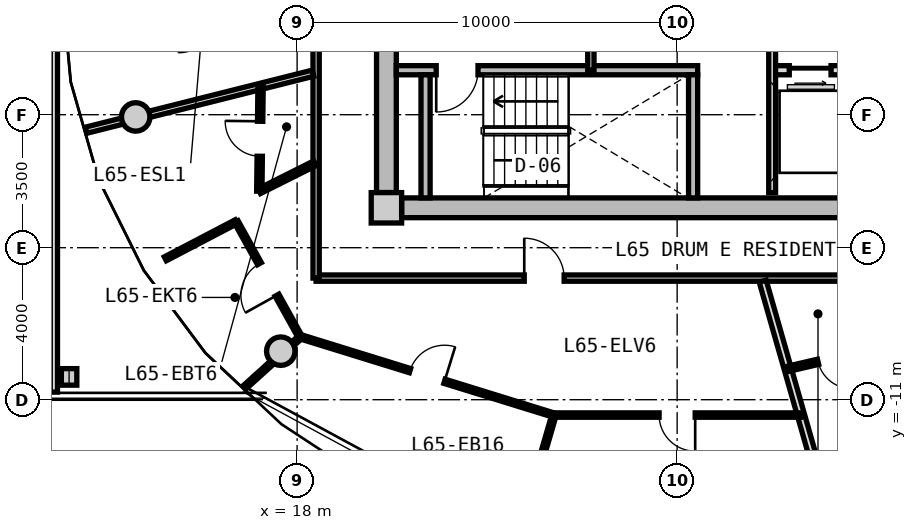
"""IFC4 building model, lengths in metres.
Left out: names, types, materials, properties, quantities, classifications, styles, units other than length and angle.
Written with IfcOpenShell. Run it as: python <this file> out.ifc"""

import sys

from ifc_helpers import new_model, si_unit, direction, frame, frame_2d, origin, origin_2d, place, context, subcontext, project, spatial, rectangle, circle, i_section, extrude, source, transform, mapped, element, fill, save


model = new_model("IFC4")
c1 = context("Model", 3, precision=1e-05, world=origin(), true_north=direction((0.0, 1.0)))
c2 = subcontext(c1, "Body", "Model", "MODEL_VIEW")
j1 = project(units=[si_unit("LENGTHUNIT", "METRE"), si_unit("PLANEANGLEUNIT", "RADIAN")], contexts=[c1])
p1 = place(None, origin())
s1 = spatial("IfcSite", under=j1, at=p1, CompositionType="ELEMENT")
p2 = place(p1, origin())
s2 = spatial("IfcBuilding", under=s1, at=p2, CompositionType="ELEMENT")
p3 = place(p2, frame((0.0, 0.0, 210.85)))
s3 = spatial("IfcBuildingStorey", under=s2, at=p3, CompositionType="ELEMENT", Elevation=210.85)
m1 = source(origin(), c2, "Body", "SweptSolid", [
    extrude(rectangle(XDim=0.8, YDim=0.8, at=origin_2d()), origin(), (0.0, 0.0, 1.0), 3.05),
])
p4 = place(p3, frame((20.35, -5.95, 0.0), z_axis=(0.0, 0.0, 1.0), x_axis=(1.0, 0.0, 0.0)))
e1 = element("IfcColumn", 1, at=p4, inside=s3, PredefinedType="COLUMN", context=c2, shape_type="MappedRepresentation", body=[
    mapped(m1, transform((0.0, 0.0, 0.0), x_axis=(1.0, 0.0, 0.0), y_axis=(0.0, 1.0, 0.0), z_axis=(0.0, 0.0, 1.0), scale=1.0)),
])
m2 = source(origin(), c2, "Body", "SweptSolid", [
    extrude(rectangle(XDim=14.5, YDim=0.52, at=frame_2d((7.25, 0.0))), origin(), (0.0, 0.0, 1.0), 2.76),
])
p5 = place(p3, frame((35.25, -5.95, 0.0), z_axis=(0.0, 0.0, 1.0), x_axis=(-1.0, 0.0, 0.0)))
e2 = element("IfcWall", 2, at=p5, inside=s3, PredefinedType="SHEAR", context=c2, shape_type="MappedRepresentation", body=[
    mapped(m2, transform((0.0, 0.0, 0.0), x_axis=(1.0, 0.0, 0.0), y_axis=(0.0, 1.0, 0.0), z_axis=(0.0, 0.0, 1.0), scale=1.0)),
])
m3 = source(origin(), c2, "Body", "SweptSolid", [
    extrude(rectangle(XDim=11.1, YDim=0.52, at=frame_2d((5.55, 0.0))), origin(), (0.0, 0.0, 1.0), 2.76),
])
p6 = place(p3, frame((20.35, -5.55, 0.0), z_axis=(0.0, 0.0, 1.0), x_axis=(0.0, 1.0, 0.0)))
e3 = element("IfcWall", 3, at=p6, inside=s3, PredefinedType="SHEAR", context=c2, shape_type="MappedRepresentation", body=[
    mapped(m3, transform((0.0, 0.0, 0.0), x_axis=(1.0, 0.0, 0.0), y_axis=(0.0, 1.0, 0.0), z_axis=(0.0, 0.0, 1.0), scale=1.0)),
])
p7 = place(p6, frame((3.8, 0.0, 0.0)))
e4 = element("IfcOpeningElement", 4, at=p7, cuts=e3, PredefinedType="OPENING", context=c2, shape_type="SweptSolid", body=[
    extrude(rectangle(XDim=1.2, YDim=2.15, at=frame_2d((0.6, 1.075))), frame((0.0, 0.27, 0.0), z_axis=(0.0, -1.0, 0.0), x_axis=(1.0, 0.0, 0.0)), (0.0, 0.0, 1.0), 0.54),
])
m4 = source(origin(), c2, "Body", "SweptSolid", [
    extrude(circle(Radius=0.375, at=origin_2d()), origin(), (0.0, 0.0, 1.0), 3.05),
])
for number, where, z_axis, x_axis in (
    (5, (13.753, -3.559, 0.0), (0.0, 0.0, 1.0), (1.0, 0.0, 0.0)),
    (6, (17.57, -9.723, 0.0), (0.0, 0.0, 1.0), (1.0, 0.0, 0.0)),
):
    element("IfcColumn", number, at=place(p3, frame(where, z_axis=z_axis, x_axis=x_axis)), inside=s3, PredefinedType="COLUMN", context=c2, shape_type="MappedRepresentation", body=[
        mapped(m4, transform((0.0, 0.0, 0.0), x_axis=(1.0, 0.0, 0.0), y_axis=(0.0, 1.0, 0.0), z_axis=(0.0, 0.0, 1.0), scale=1.0)),
    ])
m5 = source(origin(), c2, "Body", "SweptSolid", [
    extrude(i_section(OverallWidth=0.407, OverallDepth=0.435, WebThickness=0.024, FlangeThickness=0.039, FilletRadius=0.015, at=origin_2d()), origin(), (0.0, 0.0, 1.0), 3.05),
])
p8 = place(p3, frame((12.0, -10.4, 0.0), z_axis=(0.0, 0.0, 1.0), x_axis=(1.0, 0.0, 0.0)))
e7 = element("IfcColumn", 7, at=p8, inside=s3, PredefinedType="COLUMN", context=c2, shape_type="MappedRepresentation", body=[
    mapped(m5, transform((0.0, 0.0, 0.0), x_axis=(1.0, 0.0, 0.0), y_axis=(0.0, 1.0, 0.0), z_axis=(0.0, 0.0, 1.0), scale=1.0)),
])
m6 = source(origin(), c2, "Body", "SweptSolid", [
    extrude(rectangle(XDim=8.197, YDim=0.29, at=frame_2d((4.099, 0.0))), origin(), (0.0, 0.0, 1.0), 2.76),
])
p9 = place(p3, frame((39.37, -10.663, 0.0), z_axis=(0.0, 0.0, 1.0), x_axis=(-0.879369910001, -0.476139224791, 0.0)))
e8 = element("IfcWall", 8, at=p9, inside=s3, PredefinedType="SOLIDWALL", context=c2, shape_type="MappedRepresentation", body=[
    mapped(m6, transform((0.0, 0.0, 0.0), x_axis=(1.0, 0.0, 0.0), y_axis=(0.0, 1.0, 0.0), z_axis=(0.0, 0.0, 1.0), scale=1.0)),
])
p10 = place(p9, frame((0.98, 0.0, 0.0)))
e9 = element("IfcOpeningElement", 9, at=p10, cuts=e8, PredefinedType="OPENING", context=c2, shape_type="SweptSolid", body=[
    extrude(rectangle(XDim=1.15, YDim=2.25, at=frame_2d((0.575, 1.125))), frame((0.0, 0.155, 0.0), z_axis=(0.0, -1.0, 0.0), x_axis=(1.0, 0.0, 0.0)), (0.0, 0.0, 1.0), 0.31),
])
p11 = place(p9, frame((4.629, 0.0, 0.85)))
e10 = element("IfcOpeningElement", 10, at=p11, cuts=e8, PredefinedType="OPENING", context=c2, shape_type="SweptSolid", body=[
    extrude(rectangle(XDim=1.2, YDim=1.5, at=frame_2d((0.6, 0.75))), frame((0.0, 0.155, 0.0), z_axis=(0.0, -1.0, 0.0), x_axis=(1.0, 0.0, 0.0)), (0.0, 0.0, 1.0), 0.31),
])
m7 = source(origin(), c2, "Body", "SweptSolid", [
    extrude(rectangle(XDim=7.93, YDim=0.24, at=frame_2d((3.965, 0.0))), origin(), (0.0, 0.0, 1.0), 2.76),
])
p12 = place(p3, frame((20.61, -2.33, 0.0), z_axis=(0.0, 0.0, 1.0), x_axis=(1.0, 0.0, 0.0)))
e11 = element("IfcWall", 11, at=p12, inside=s3, PredefinedType="PARTITIONING", context=c2, shape_type="MappedRepresentation", body=[
    mapped(m7, transform((0.0, 0.0, 0.0), x_axis=(1.0, 0.0, 0.0), y_axis=(0.0, 1.0, 0.0), z_axis=(0.0, 0.0, 1.0), scale=1.0)),
])
p13 = place(p12, frame((1.05, 0.0, 0.0)))
e12 = element("IfcOpeningElement", 12, at=p13, cuts=e11, PredefinedType="OPENING", context=c2, shape_type="SweptSolid", body=[
    extrude(rectangle(XDim=1.1, YDim=2.15, at=frame_2d((0.55, 1.075))), frame((0.0, 0.13, 0.0), z_axis=(0.0, -1.0, 0.0), x_axis=(1.0, 0.0, 0.0)), (0.0, 0.0, 1.0), 0.26),
])
m8 = source(origin(), c2, "Body", "SweptSolid", [
    extrude(rectangle(XDim=3.24, YDim=0.24, at=frame_2d((1.62, 0.0))), origin(), (0.0, 0.0, 1.0), 2.76),
])
for number, where, z_axis, x_axis in (
    (13, (21.38, -5.69, 0.0), (0.0, 0.0, 1.0), (0.0, 1.0, 0.0)),
    (14, (28.42, -5.69, 0.0), (0.0, 0.0, 1.0), (0.0, 1.0, 0.0)),
):
    element("IfcWall", number, at=place(p3, frame(where, z_axis=z_axis, x_axis=x_axis)), inside=s3, PredefinedType="PARTITIONING", context=c2, shape_type="MappedRepresentation", body=[
        mapped(m8, transform((0.0, 0.0, 0.0), x_axis=(1.0, 0.0, 0.0), y_axis=(0.0, 1.0, 0.0), z_axis=(0.0, 0.0, 1.0), scale=1.0)),
    ])
m9 = source(origin(), c2, "Body", "SweptSolid", [
    extrude(rectangle(XDim=2.05, YDim=0.24, at=frame_2d((1.025, 0.0))), origin(), (0.0, 0.0, 1.0), 2.745),
])
p14 = place(p3, frame((30.5, -2.33, 0.0), z_axis=(0.0, 0.0, 1.0), x_axis=(1.0, 0.0, 0.0)))
e15 = element("IfcWall", 15, at=p14, inside=s3, PredefinedType="PARTITIONING", context=c2, shape_type="MappedRepresentation", body=[
    mapped(m9, transform((0.0, 0.0, 0.0), x_axis=(1.0, 0.0, 0.0), y_axis=(0.0, 1.0, 0.0), z_axis=(0.0, 0.0, 1.0), scale=1.0)),
])
p15 = place(p14, frame((0.45, 0.0, 0.0)))
e16 = element("IfcOpeningElement", 16, at=p15, cuts=e15, PredefinedType="OPENING", context=c2, shape_type="SweptSolid", body=[
    extrude(rectangle(XDim=1.1, YDim=2.2, at=frame_2d((0.55, 1.1))), frame((0.0, 0.13, 0.0), z_axis=(0.0, -1.0, 0.0), x_axis=(1.0, 0.0, 0.0)), (0.0, 0.0, 1.0), 0.26),
])
m10 = source(origin(), c2, "Body", "SweptSolid", [
    extrude(rectangle(XDim=4.2, YDim=0.18, at=frame_2d((2.1, 0.0))), origin(), (0.0, 0.0, 1.0), 2.745),
])
p16 = place(p3, frame((30.5, -5.55, 0.0), z_axis=(0.0, 0.0, 1.0), x_axis=(0.0, 1.0, 0.0)))
e17 = element("IfcWall", 17, at=p16, inside=s3, PredefinedType="PARTITIONING", context=c2, shape_type="MappedRepresentation", body=[
    mapped(m10, transform((0.0, 0.0, 0.0), x_axis=(1.0, 0.0, 0.0), y_axis=(0.0, 1.0, 0.0), z_axis=(0.0, 0.0, 1.0), scale=1.0)),
])
m11 = source(origin(), c2, "Body", "SweptSolid", [
    extrude(rectangle(XDim=0.98, YDim=0.165, at=frame_2d((0.49, 0.0))), origin(), (0.0, 0.0, 1.0), 2.745),
])
p17 = place(p3, frame((25.73, -2.33, 0.0), z_axis=(0.0, 0.0, 1.0), x_axis=(0.0, 1.0, 0.0)))
e18 = element("IfcWall", 18, at=p17, inside=s3, PredefinedType="PARTITIONING", context=c2, shape_type="MappedRepresentation", body=[
    mapped(m11, transform((0.0, 0.0, 0.0), x_axis=(1.0, 0.0, 0.0), y_axis=(0.0, 1.0, 0.0), z_axis=(0.0, 0.0, 1.0), scale=1.0)),
])
m12 = source(origin(), c2, "Body", "SweptSolid", [
    extrude(rectangle(XDim=19.0, YDim=0.165, at=frame_2d((9.5, 0.0))), origin(), (0.0, 0.0, 1.0), 2.745),
])
p18 = place(p3, frame((37.5, -7.8, 0.0), z_axis=(0.0, 0.0, 1.0), x_axis=(-1.0, 0.0, 0.0)))
e19 = element("IfcWall", 19, at=p18, inside=s3, PredefinedType="PARTITIONING", context=c2, shape_type="MappedRepresentation", body=[
    mapped(m12, transform((0.0, 0.0, 0.0), x_axis=(1.0, 0.0, 0.0), y_axis=(0.0, 1.0, 0.0), z_axis=(0.0, 0.0, 1.0), scale=1.0)),
])
p19 = place(p18, frame((12.473, 0.0, 0.0)))
e20 = element("IfcOpeningElement", 20, at=p19, cuts=e19, PredefinedType="OPENING", context=c2, shape_type="SweptSolid", body=[
    extrude(rectangle(XDim=1.05, YDim=2.15, at=frame_2d((0.525, 1.075))), frame((0.0, 0.093, 0.0), z_axis=(0.0, -1.0, 0.0), x_axis=(1.0, 0.0, 0.0)), (0.0, 0.0, 1.0), 0.185),
])
m13 = source(origin(), c2, "Body", "SweptSolid", [
    extrude(rectangle(XDim=6.88, YDim=0.165, at=frame_2d((3.44, 0.0))), origin(), (0.0, 0.0, 1.0), 2.745),
])
p20 = place(p3, frame((18.5, -7.8, 0.0), z_axis=(0.0, 0.0, 1.0), x_axis=(0.0, 1.0, 0.0)))
e21 = element("IfcWall", 21, at=p20, inside=s3, PredefinedType="PARTITIONING", context=c2, shape_type="MappedRepresentation", body=[
    mapped(m13, transform((0.0, 0.0, 0.0), x_axis=(1.0, 0.0, 0.0), y_axis=(0.0, 1.0, 0.0), z_axis=(0.0, 0.0, 1.0), scale=1.0)),
])
m14 = source(origin(), c2, "Body", "SweptSolid", [
    extrude(rectangle(XDim=6.157, YDim=0.165, at=frame_2d((3.079, 0.0))), origin(), (0.0, 0.0, 1.0), 2.345),
])
p21 = place(p3, frame((18.42, -2.407, 0.0), z_axis=(0.0, 0.0, 1.0), x_axis=(-0.969840867184, -0.243738984038, 0.0)))
e22 = element("IfcWall", 22, at=p21, inside=s3, PredefinedType="PARTITIONING", context=c2, shape_type="MappedRepresentation", body=[
    mapped(m14, transform((0.0, 0.0, 0.0), x_axis=(1.0, 0.0, 0.0), y_axis=(0.0, 1.0, 0.0), z_axis=(0.0, 0.0, 1.0), scale=1.0)),
])
m15 = source(origin(), c2, "Body", "SweptSolid", [
    extrude(rectangle(XDim=6.974, YDim=0.19, at=frame_2d((3.487, 0.0))), origin(), (0.0, 0.0, 1.0), 2.345),
])
p22 = place(p3, frame((30.251, -7.88, 0.0), z_axis=(0.0, 0.0, 1.0), x_axis=(0.274707256801, -0.961527910703, 0.0)))
e23 = element("IfcWall", 23, at=p22, inside=s3, PredefinedType="PARTITIONING", context=c2, shape_type="MappedRepresentation", body=[
    mapped(m15, transform((0.0, 0.0, 0.0), x_axis=(1.0, 0.0, 0.0), y_axis=(0.0, 1.0, 0.0), z_axis=(0.0, 0.0, 1.0), scale=1.0)),
])
m16 = source(origin(), c2, "Body", "SweptSolid", [
    extrude(rectangle(XDim=6.98, YDim=0.115, at=frame_2d((3.49, 0.0))), origin(), (0.0, 0.0, 1.0), 2.745),
])
p23 = place(p3, frame((18.091, -9.344, 0.0), z_axis=(0.0, 0.0, 1.0), x_axis=(0.955342331637, -0.295501318749, 0.0)))
e24 = element("IfcWall", 24, at=p23, inside=s3, PredefinedType="PARTITIONING", context=c2, shape_type="MappedRepresentation", body=[
    mapped(m16, transform((0.0, 0.0, 0.0), x_axis=(1.0, 0.0, 0.0), y_axis=(0.0, 1.0, 0.0), z_axis=(0.0, 0.0, 1.0), scale=1.0)),
])
p24 = place(p23, frame((3.015, 0.0, 0.0)))
e25 = element("IfcOpeningElement", 25, at=p24, cuts=e24, PredefinedType="OPENING", context=c2, shape_type="SweptSolid", body=[
    extrude(rectangle(XDim=0.95, YDim=2.1, at=frame_2d((0.475, 1.05))), frame((0.0, 0.067, 0.0), z_axis=(0.0, -1.0, 0.0), x_axis=(1.0, 0.0, 0.0)), (0.0, 0.0, 1.0), 0.135),
])
m17 = source(origin(), c2, "Body", "SweptSolid", [
    extrude(rectangle(XDim=1.988, YDim=0.115, at=frame_2d((0.994, 0.0))), origin(), (0.0, 0.0, 1.0), 2.345),
])
p25 = place(p3, frame((18.091, -9.344, 0.0), z_axis=(0.0, 0.0, 1.0), x_axis=(-0.741992301729, -0.670408401033, 0.0)))
e26 = element("IfcWall", 26, at=p25, inside=s3, PredefinedType="PARTITIONING", context=c2, shape_type="MappedRepresentation", body=[
    mapped(m17, transform((0.0, 0.0, 0.0), x_axis=(1.0, 0.0, 0.0), y_axis=(0.0, 1.0, 0.0), z_axis=(0.0, 0.0, 1.0), scale=1.0)),
])
m18 = source(origin(), c2, "Body", "SweptSolid", [
    extrude(rectangle(XDim=6.481, YDim=0.115, at=frame_2d((3.24, 0.0))), origin(), (0.0, 0.0, 1.0), 2.745),
])
p26 = place(p3, frame((24.76, -11.404, 0.0), z_axis=(0.0, 0.0, 1.0), x_axis=(1.0, 0.0, 0.0)))
e27 = element("IfcWall", 27, at=p26, inside=s3, PredefinedType="PARTITIONING", context=c2, shape_type="MappedRepresentation", body=[
    mapped(m18, transform((0.0, 0.0, 0.0), x_axis=(1.0, 0.0, 0.0), y_axis=(0.0, 1.0, 0.0), z_axis=(0.0, 0.0, 1.0), scale=1.0)),
])
p27 = place(p26, frame((2.765, 0.0, 0.0)))
e28 = element("IfcOpeningElement", 28, at=p27, cuts=e27, PredefinedType="OPENING", context=c2, shape_type="SweptSolid", body=[
    extrude(rectangle(XDim=0.95, YDim=2.1, at=frame_2d((0.475, 1.05))), frame((0.0, 0.067, 0.0), z_axis=(0.0, -1.0, 0.0), x_axis=(1.0, 0.0, 0.0)), (0.0, 0.0, 1.0), 0.135),
])
m19 = source(origin(), c2, "Body", "SweptSolid", [
    extrude(rectangle(XDim=3.313, YDim=0.115, at=frame_2d((1.657, 0.0))), origin(), (0.0, 0.0, 1.0), 2.345),
])
p28 = place(p3, frame((24.76, -11.404, 0.0), z_axis=(0.0, 0.0, 1.0), x_axis=(-0.279612365916, -0.960112975033, 0.0)))
e29 = element("IfcWall", 29, at=p28, inside=s3, PredefinedType="PARTITIONING", context=c2, shape_type="MappedRepresentation", body=[
    mapped(m19, transform((0.0, 0.0, 0.0), x_axis=(1.0, 0.0, 0.0), y_axis=(0.0, 1.0, 0.0), z_axis=(0.0, 0.0, 1.0), scale=1.0)),
])
m20 = source(origin(), c2, "Body", "SweptSolid", [
    extrude(rectangle(XDim=1.638, YDim=0.14, at=frame_2d((0.819, 0.0))), origin(), (0.0, 0.0, 1.0), 2.745),
])
p29 = place(p3, frame((18.47, -4.778, 0.0), z_axis=(0.0, 0.0, 1.0), x_axis=(-0.893919977945, -0.448226586707, 0.0)))
e30 = element("IfcWall", 30, at=p29, inside=s3, PredefinedType="PARTITIONING", context=c2, shape_type="MappedRepresentation", body=[
    mapped(m20, transform((0.0, 0.0, 0.0), x_axis=(1.0, 0.0, 0.0), y_axis=(0.0, 1.0, 0.0), z_axis=(0.0, 0.0, 1.0), scale=1.0)),
])
m21 = source(origin(), c2, "Body", "SweptSolid", [
    extrude(rectangle(XDim=2.759, YDim=0.14, at=frame_2d((1.379, 0.0))), origin(), (0.0, 0.0, 1.0), 2.745),
])
p30 = place(p3, frame((17.005, -5.513, 0.0), z_axis=(0.0, 0.0, 1.0), x_axis=(0.01194710728, 0.999928630767, 0.0)))
e31 = element("IfcWall", 31, at=p30, inside=s3, PredefinedType="PARTITIONING", context=c2, shape_type="MappedRepresentation", body=[
    mapped(m21, transform((0.0, 0.0, 0.0), x_axis=(1.0, 0.0, 0.0), y_axis=(0.0, 1.0, 0.0), z_axis=(0.0, 0.0, 1.0), scale=1.0)),
])
p31 = place(p30, frame((0.919, 0.0, 0.0)))
e32 = element("IfcOpeningElement", 32, at=p31, cuts=e31, PredefinedType="OPENING", context=c2, shape_type="SweptSolid", body=[
    extrude(rectangle(XDim=0.92, YDim=2.1, at=frame_2d((0.46, 1.05))), frame((0.0, 0.08, 0.0), z_axis=(0.0, -1.0, 0.0), x_axis=(1.0, 0.0, 0.0)), (0.0, 0.0, 1.0), 0.16),
])
m22 = source(origin(), c2, "Body", "SweptSolid", [
    extrude(rectangle(XDim=2.104, YDim=0.115, at=frame_2d((1.052, 0.0))), origin(), (0.0, 0.0, 1.0), 2.745),
])
p32 = place(p3, frame((16.396, -6.317, 0.0), z_axis=(0.0, 0.0, 1.0), x_axis=(-0.886060817493, -0.463569010724, 0.0)))
e33 = element("IfcWall", 33, at=p32, inside=s3, PredefinedType="PARTITIONING", context=c2, shape_type="MappedRepresentation", body=[
    mapped(m22, transform((0.0, 0.0, 0.0), x_axis=(1.0, 0.0, 0.0), y_axis=(0.0, 1.0, 0.0), z_axis=(0.0, 0.0, 1.0), scale=1.0)),
])
m23 = source(origin(), c2, "Body", "SweptSolid", [
    extrude(rectangle(XDim=3.472, YDim=0.115, at=frame_2d((1.736, 0.0))), origin(), (0.0, 0.0, 1.0), 2.745),
])
p33 = place(p3, frame((16.396, -6.317, 0.0), z_axis=(0.0, 0.0, 1.0), x_axis=(0.485804139346, -0.874067696574, 0.0)))
e34 = element("IfcWall", 34, at=p33, inside=s3, PredefinedType="PARTITIONING", context=c2, shape_type="MappedRepresentation", body=[
    mapped(m23, transform((0.0, 0.0, 0.0), x_axis=(1.0, 0.0, 0.0), y_axis=(0.0, 1.0, 0.0), z_axis=(0.0, 0.0, 1.0), scale=1.0)),
])
p34 = place(p33, frame((1.261, 0.0, 0.0)))
e35 = element("IfcOpeningElement", 35, at=p34, cuts=e34, PredefinedType="OPENING", context=c2, shape_type="SweptSolid", body=[
    extrude(rectangle(XDim=0.95, YDim=2.1, at=frame_2d((0.475, 1.05))), frame((0.0, 0.067, 0.0), z_axis=(0.0, -1.0, 0.0), x_axis=(1.0, 0.0, 0.0)), (0.0, 0.0, 1.0), 0.135),
])
m24 = source(origin(), c2, "Body", "SweptSolid", [
    extrude(rectangle(XDim=2.586, YDim=0.14, at=frame_2d((1.293, 0.0))), origin(), (0.0, 0.0, 1.0), 2.745),
])
p35 = place(p3, frame((33.415, -9.603, 0.0), z_axis=(0.0, 0.0, 1.0), x_axis=(-0.973691298219, -0.227871138526, 0.0)))
e36 = element("IfcWall", 36, at=p35, inside=s3, PredefinedType="PARTITIONING", context=c2, shape_type="MappedRepresentation", body=[
    mapped(m24, transform((0.0, 0.0, 0.0), x_axis=(1.0, 0.0, 0.0), y_axis=(0.0, 1.0, 0.0), z_axis=(0.0, 0.0, 1.0), scale=1.0)),
])
p36 = place(p35, frame((0.833, 0.0, 0.0)))
e37 = element("IfcOpeningElement", 37, at=p36, cuts=e36, PredefinedType="OPENING", context=c2, shape_type="SweptSolid", body=[
    extrude(rectangle(XDim=0.92, YDim=2.1, at=frame_2d((0.46, 1.05))), frame((0.0, 0.08, 0.0), z_axis=(0.0, -1.0, 0.0), x_axis=(1.0, 0.0, 0.0)), (0.0, 0.0, 1.0), 0.16),
])
m25 = source(origin(), c2, "Body", "SweptSolid", [
    extrude(rectangle(XDim=9.88, YDim=0.19, at=frame_2d((4.94, 0.0))), origin(), (0.0, 0.0, 1.0), 2.745),
])
p37 = place(p3, frame((11.6, -10.8, 0.0), z_axis=(0.0, 0.0, 1.0), x_axis=(0.0, 1.0, 0.0)))
e38 = element("IfcWall", 38, at=p37, inside=s3, PredefinedType="PARTITIONING", context=c2, shape_type="MappedRepresentation", body=[
    mapped(m25, transform((0.0, 0.0, 0.0), x_axis=(1.0, 0.0, 0.0), y_axis=(0.0, 1.0, 0.0), z_axis=(0.0, 0.0, 1.0), scale=1.0)),
])
m26 = source(origin(), c2, "Body", "SweptSolid", [
    extrude(rectangle(XDim=1.1, YDim=2.15, at=frame_2d((0.55, 1.075))), frame((0.0, 0.025, 0.0), z_axis=(0.0, -1.0, 0.0), x_axis=(1.0, 0.0, 0.0)), (0.0, 0.0, 1.0), 0.05),
])
p38 = place(p13, frame((1.1, 0.0, 0.0), z_axis=(0.0, 0.0, 1.0), x_axis=(-1.0, 0.0, 0.0)))
e39 = element("IfcDoor", 39, at=p38, inside=s3, OperationType="SINGLE_SWING_RIGHT", PredefinedType="DOOR", context=c2, shape_type="MappedRepresentation", body=[
    mapped(m26, transform((0.0, 0.0, 0.0), x_axis=(1.0, 0.0, 0.0), y_axis=(0.0, 1.0, 0.0), z_axis=(0.0, 0.0, 1.0), scale=1.0)),
])
fill(e12, e39)
m27 = source(origin(), c2, "Body", "SweptSolid", [
    extrude(rectangle(XDim=1.1, YDim=2.2, at=frame_2d((0.55, 1.1))), frame((0.0, 0.025, 0.0), z_axis=(0.0, -1.0, 0.0), x_axis=(1.0, 0.0, 0.0)), (0.0, 0.0, 1.0), 0.05),
])
p39 = place(p15, frame((1.1, 0.0, 0.0), z_axis=(0.0, 0.0, 1.0), x_axis=(-1.0, 0.0, 0.0)))
e40 = element("IfcDoor", 40, at=p39, inside=s3, OperationType="SLIDING_TO_RIGHT", PredefinedType="DOOR", context=c2, shape_type="MappedRepresentation", body=[
    mapped(m27, transform((0.0, 0.0, 0.0), x_axis=(1.0, 0.0, 0.0), y_axis=(0.0, 1.0, 0.0), z_axis=(0.0, 0.0, 1.0), scale=1.0)),
])
fill(e16, e40)
m28 = source(origin(), c2, "Body", "SweptSolid", [
    extrude(rectangle(XDim=1.05, YDim=2.15, at=frame_2d((0.525, 1.075))), frame((0.0, 0.025, 0.0), z_axis=(0.0, -1.0, 0.0), x_axis=(1.0, 0.0, 0.0)), (0.0, 0.0, 1.0), 0.05),
])
p40 = place(p19, frame((1.05, 0.0, 0.0), z_axis=(0.0, 0.0, 1.0), x_axis=(-1.0, 0.0, 0.0)))
e41 = element("IfcDoor", 41, at=p40, inside=s3, OperationType="SINGLE_SWING_LEFT", PredefinedType="DOOR", context=c2, shape_type="MappedRepresentation", body=[
    mapped(m28, transform((0.0, 0.0, 0.0), x_axis=(1.0, 0.0, 0.0), y_axis=(0.0, 1.0, 0.0), z_axis=(0.0, 0.0, 1.0), scale=1.0)),
])
fill(e20, e41)
m29 = source(origin(), c2, "Body", "SweptSolid", [
    extrude(rectangle(XDim=0.92, YDim=2.1, at=frame_2d((0.46, 1.05))), frame((0.0, 0.025, 0.0), z_axis=(0.0, -1.0, 0.0), x_axis=(1.0, 0.0, 0.0)), (0.0, 0.0, 1.0), 0.05),
])
p41 = place(p31, origin())
e42 = element("IfcDoor", 42, at=p41, inside=s3, OperationType="SINGLE_SWING_RIGHT", PredefinedType="DOOR", context=c2, shape_type="MappedRepresentation", body=[
    mapped(m29, transform((0.0, 0.0, 0.0), x_axis=(1.0, 0.0, 0.0), y_axis=(0.0, 1.0, 0.0), z_axis=(0.0, 0.0, 1.0), scale=1.0)),
])
fill(e32, e42)
m30 = source(origin(), c2, "Body", "SweptSolid", [
    extrude(rectangle(XDim=0.95, YDim=2.1, at=frame_2d((0.475, 1.05))), frame((0.0, 0.025, 0.0), z_axis=(0.0, -1.0, 0.0), x_axis=(1.0, 0.0, 0.0)), (0.0, 0.0, 1.0), 0.05),
])
p42 = place(p34, frame((0.95, 0.0, 0.0), z_axis=(0.0, 0.0, 1.0), x_axis=(-1.0, 0.0, 0.0)))
e43 = element("IfcDoor", 43, at=p42, inside=s3, OperationType="SINGLE_SWING_LEFT", PredefinedType="DOOR", context=c2, shape_type="MappedRepresentation", body=[
    mapped(m30, transform((0.0, 0.0, 0.0), x_axis=(1.0, 0.0, 0.0), y_axis=(0.0, 1.0, 0.0), z_axis=(0.0, 0.0, 1.0), scale=1.0)),
])
fill(e35, e43)
p43 = place(p24, origin())
e44 = element("IfcDoor", 44, at=p43, inside=s3, OperationType="SINGLE_SWING_RIGHT", PredefinedType="DOOR", context=c2, shape_type="MappedRepresentation", body=[
    mapped(m30, transform((0.0, 0.0, 0.0), x_axis=(1.0, 0.0, 0.0), y_axis=(0.0, 1.0, 0.0), z_axis=(0.0, 0.0, 1.0), scale=1.0)),
])
fill(e25, e44)
p44 = place(p27, frame((0.95, 0.0, 0.0), z_axis=(0.0, 0.0, 1.0), x_axis=(-1.0, 0.0, 0.0)))
e45 = element("IfcDoor", 45, at=p44, inside=s3, OperationType="SINGLE_SWING_LEFT", PredefinedType="DOOR", context=c2, shape_type="MappedRepresentation", body=[
    mapped(m30, transform((0.0, 0.0, 0.0), x_axis=(1.0, 0.0, 0.0), y_axis=(0.0, 1.0, 0.0), z_axis=(0.0, 0.0, 1.0), scale=1.0)),
])
fill(e28, e45)
p45 = place(p36, origin())
e46 = element("IfcDoor", 46, at=p45, inside=s3, OperationType="SINGLE_SWING_LEFT", PredefinedType="DOOR", context=c2, shape_type="MappedRepresentation", body=[
    mapped(m29, transform((0.0, 0.0, 0.0), x_axis=(1.0, 0.0, 0.0), y_axis=(0.0, 1.0, 0.0), z_axis=(0.0, 0.0, 1.0), scale=1.0)),
])
fill(e37, e46)
save(model, sys.argv[1])
